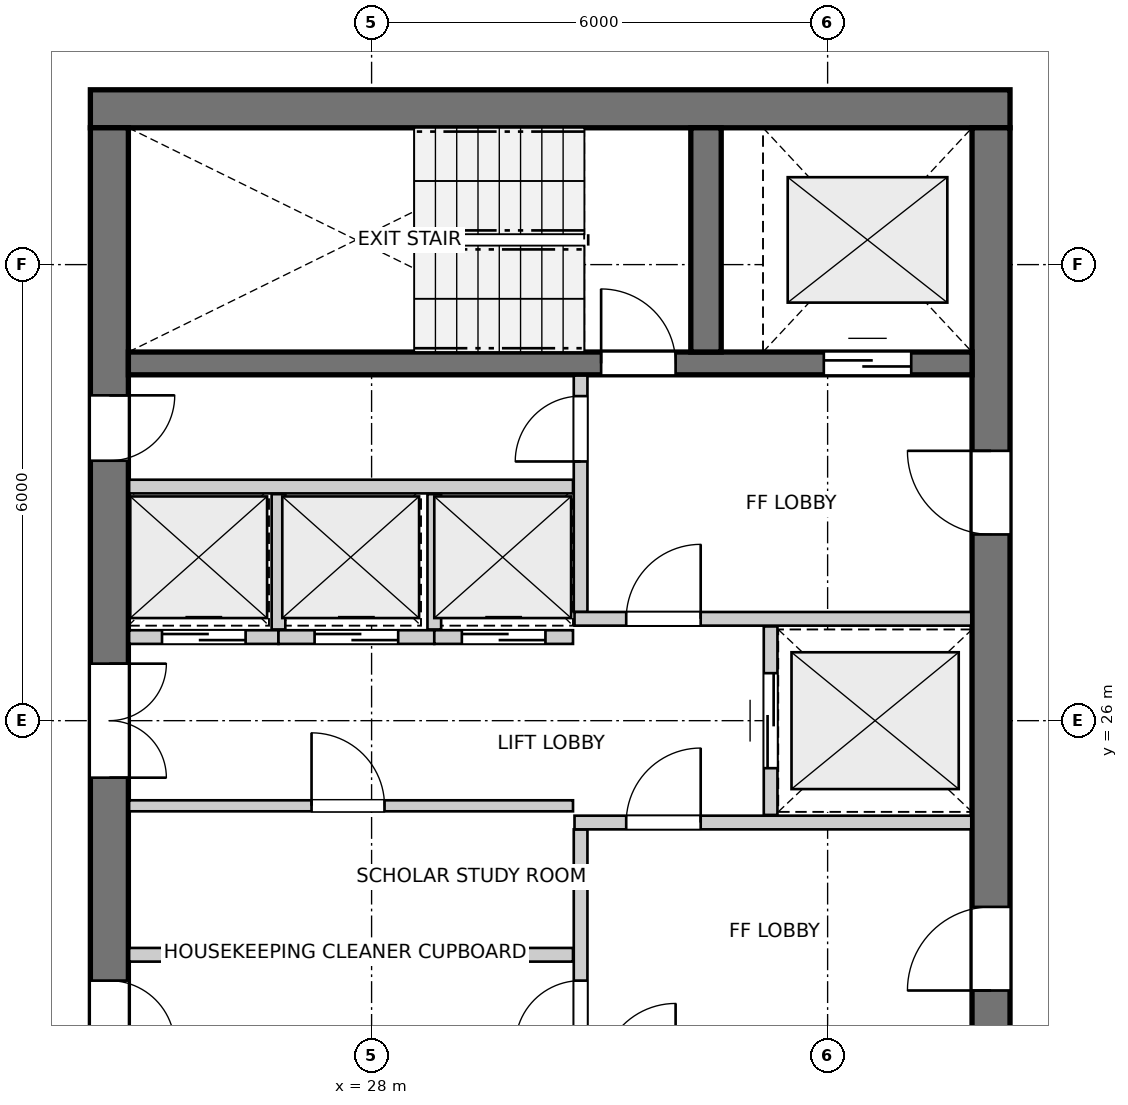
"""IFC4 building model, lengths in metres.
Left out: names, types, materials, properties, quantities, classifications, styles, units other than length and angle.
Written with IfcOpenShell. Run it as: python <this file> out.ifc"""

import sys

from ifc_helpers import new_model, si_unit, direction, frame, frame_2d, origin, place, context, subcontext, project, spatial, rectangle, extrude, source, transform, mapped, element, fill, save


model = new_model("IFC4")
c1 = context("Model", 3, precision=1e-05, world=origin(), true_north=direction((0.0, 1.0)))
c2 = subcontext(c1, "Body", "Model", "MODEL_VIEW")
j1 = project(units=[si_unit("LENGTHUNIT", "METRE"), si_unit("PLANEANGLEUNIT", "RADIAN")], contexts=[c1])
p1 = place(None, origin())
s1 = spatial("IfcSite", under=j1, at=p1, CompositionType="ELEMENT")
p2 = place(p1, origin())
s2 = spatial("IfcBuilding", under=s1, at=p2, CompositionType="ELEMENT")
p3 = place(p2, frame((0.0, 0.0, 202.0)))
s3 = spatial("IfcBuildingStorey", under=s2, at=p3, CompositionType="ELEMENT", Elevation=202.0)
p4 = place(p3, frame((36.4, 34.05, 0.0), z_axis=(0.0, 0.0, 1.0), x_axis=(-1.0, 0.0, 0.0)))
e1 = element("IfcWall", 1, at=p4, inside=s3, PredefinedType="SHEAR", context=c2, shape_type="SweptSolid", body=[
    extrude(rectangle(XDim=12.1, YDim=0.5, at=frame_2d((6.05, 0.0))), origin(), (0.0, 0.0, 1.0), 2.935),
])
p5 = place(p3, frame((24.55, 33.8, 0.0), z_axis=(0.0, 0.0, 1.0), x_axis=(0.0, -1.0, 0.0)))
e2 = element("IfcWall", 2, at=p5, inside=s3, PredefinedType="SHEAR", context=c2, shape_type="SweptSolid", body=[
    extrude(rectangle(XDim=15.6, YDim=0.5, at=frame_2d((7.8, 0.0))), origin(), (0.0, 0.0, 1.0), 2.935),
])
p6 = place(p5, frame((7.05, 0.0, 0.0)))
e3 = element("IfcOpeningElement", 3, at=p6, cuts=e2, PredefinedType="OPENING", context=c2, shape_type="SweptSolid", body=[
    extrude(rectangle(XDim=1.5, YDim=2.15, at=frame_2d((0.75, 1.075))), frame((0.0, 0.26, 0.0), z_axis=(0.0, -1.0, 0.0), x_axis=(1.0, 0.0, 0.0)), (0.0, 0.0, 1.0), 0.52),
])
p7 = place(p5, frame((3.52, 0.0, 0.0)))
e4 = element("IfcOpeningElement", 4, at=p7, cuts=e2, PredefinedType="OPENING", context=c2, shape_type="SweptSolid", body=[
    extrude(rectangle(XDim=0.86, YDim=2.05, at=frame_2d((0.43, 1.025))), frame((0.0, 0.26, 0.0), z_axis=(0.0, -1.0, 0.0), x_axis=(1.0, 0.0, 0.0)), (0.0, 0.0, 1.0), 0.52),
])
p8 = place(p5, frame((11.22, 0.0, 0.0)))
e5 = element("IfcOpeningElement", 5, at=p8, cuts=e2, PredefinedType="OPENING", context=c2, shape_type="SweptSolid", body=[
    extrude(rectangle(XDim=0.86, YDim=2.05, at=frame_2d((0.43, 1.025))), frame((0.0, 0.26, 0.0), z_axis=(0.0, -1.0, 0.0), x_axis=(1.0, 0.0, 0.0)), (0.0, 0.0, 1.0), 0.52),
])
p9 = place(p3, frame((36.15, 18.2, 0.0), z_axis=(0.0, 0.0, 1.0), x_axis=(0.0, 1.0, 0.0)))
e6 = element("IfcWall", 6, at=p9, inside=s3, PredefinedType="SHEAR", context=c2, shape_type="SweptSolid", body=[
    extrude(rectangle(XDim=15.6, YDim=0.5, at=frame_2d((7.8, 0.0))), origin(), (0.0, 0.0, 1.0), 2.935),
])
p10 = place(p9, frame((4.25, 0.0, 0.0)))
e7 = element("IfcOpeningElement", 7, at=p10, cuts=e6, PredefinedType="OPENING", context=c2, shape_type="SweptSolid", body=[
    extrude(rectangle(XDim=1.1, YDim=2.15, at=frame_2d((0.55, 1.075))), frame((0.0, 0.26, 0.0), z_axis=(0.0, -1.0, 0.0), x_axis=(1.0, 0.0, 0.0)), (0.0, 0.0, 1.0), 0.52),
])
p11 = place(p9, frame((10.25, 0.0, 0.0)))
e8 = element("IfcOpeningElement", 8, at=p11, cuts=e6, PredefinedType="OPENING", context=c2, shape_type="SweptSolid", body=[
    extrude(rectangle(XDim=1.1, YDim=2.15, at=frame_2d((0.55, 1.075))), frame((0.0, 0.26, 0.0), z_axis=(0.0, -1.0, 0.0), x_axis=(1.0, 0.0, 0.0)), (0.0, 0.0, 1.0), 0.52),
])
p12 = place(p3, frame((24.8, 30.7, 0.0), z_axis=(0.0, 0.0, 1.0), x_axis=(1.0, 0.0, 0.0)))
e9 = element("IfcWall", 9, at=p12, inside=s3, PredefinedType="SHEAR", context=c2, shape_type="SweptSolid", body=[
    extrude(rectangle(XDim=11.1, YDim=0.3, at=frame_2d((5.55, 0.0))), origin(), (0.0, 0.0, 1.0), 2.935),
])
p13 = place(p12, frame((6.22, 0.0, 0.0)))
e10 = element("IfcOpeningElement", 10, at=p13, cuts=e9, PredefinedType="OPENING", context=c2, shape_type="SweptSolid", body=[
    extrude(rectangle(XDim=0.98, YDim=2.15, at=frame_2d((0.49, 1.075))), frame((0.0, 0.16, 0.0), z_axis=(0.0, -1.0, 0.0), x_axis=(1.0, 0.0, 0.0)), (0.0, 0.0, 1.0), 0.32),
])
p14 = place(p12, frame((9.15, 0.0, 0.0)))
e11 = element("IfcOpeningElement", 11, at=p14, cuts=e9, PredefinedType="OPENING", context=c2, shape_type="SweptSolid", body=[
    extrude(rectangle(XDim=1.15, YDim=2.15, at=frame_2d((0.575, 1.075))), frame((0.0, 0.16, 0.0), z_axis=(0.0, -1.0, 0.0), x_axis=(1.0, 0.0, 0.0)), (0.0, 0.0, 1.0), 0.32),
])
p15 = place(p3, frame((32.4, 30.85, 0.0), z_axis=(0.0, 0.0, 1.0), x_axis=(0.0, 1.0, 0.0)))
e12 = element("IfcWall", 12, at=p15, inside=s3, PredefinedType="SHEAR", context=c2, shape_type="SweptSolid", body=[
    extrude(rectangle(XDim=2.95, YDim=0.4, at=frame_2d((1.475, 0.0))), origin(), (0.0, 0.0, 1.0), 2.935),
])
p16 = place(p3, frame((30.75, 21.46, 0.0), z_axis=(0.0, 0.0, 1.0), x_axis=(0.0, 1.0, 0.0)))
e13 = element("IfcWall", 13, at=p16, inside=s3, PredefinedType="PARTITIONING", context=c2, shape_type="SweptSolid", body=[
    extrude(rectangle(XDim=3.11, YDim=0.18, at=frame_2d((1.555, 0.0))), origin(), (0.0, 0.0, 1.0), 2.935),
])
p17 = place(p16, frame((0.26, 0.0, 0.0)))
e14 = element("IfcOpeningElement", 14, at=p17, cuts=e13, PredefinedType="OPENING", context=c2, shape_type="SweptSolid", body=[
    extrude(rectangle(XDim=0.86, YDim=2.05, at=frame_2d((0.43, 1.025))), frame((0.0, 0.1, 0.0), z_axis=(0.0, -1.0, 0.0), x_axis=(1.0, 0.0, 0.0)), (0.0, 0.0, 1.0), 0.2),
])
p18 = place(p3, frame((30.67, 24.66, 0.0), z_axis=(0.0, 0.0, 1.0), x_axis=(1.0, 0.0, 0.0)))
e15 = element("IfcWall", 15, at=p18, inside=s3, PredefinedType="PARTITIONING", context=c2, shape_type="SweptSolid", body=[
    extrude(rectangle(XDim=5.22, YDim=0.18, at=frame_2d((2.61, 0.0))), origin(), (0.0, 0.0, 1.0), 2.935),
])
p19 = place(p18, frame((0.68, 0.0, 0.0)))
e16 = element("IfcOpeningElement", 16, at=p19, cuts=e15, PredefinedType="OPENING", context=c2, shape_type="SweptSolid", body=[
    extrude(rectangle(XDim=0.98, YDim=2.15, at=frame_2d((0.49, 1.075))), frame((0.0, 0.1, 0.0), z_axis=(0.0, -1.0, 0.0), x_axis=(1.0, 0.0, 0.0)), (0.0, 0.0, 1.0), 0.2),
])
p20 = place(p3, frame((30.75, 27.43, 0.0), z_axis=(0.0, 0.0, 1.0), x_axis=(0.0, 1.0, 0.0)))
e17 = element("IfcWall", 17, at=p20, inside=s3, PredefinedType="PARTITIONING", context=c2, shape_type="SweptSolid", body=[
    extrude(rectangle(XDim=3.11, YDim=0.18, at=frame_2d((1.555, 0.0))), origin(), (0.0, 0.0, 1.0), 2.935),
])
p21 = place(p20, frame((1.98, 0.0, 0.0)))
e18 = element("IfcOpeningElement", 18, at=p21, cuts=e17, PredefinedType="OPENING", context=c2, shape_type="SweptSolid", body=[
    extrude(rectangle(XDim=0.86, YDim=2.05, at=frame_2d((0.43, 1.025))), frame((0.0, 0.1, 0.0), z_axis=(0.0, -1.0, 0.0), x_axis=(1.0, 0.0, 0.0)), (0.0, 0.0, 1.0), 0.2),
])
p22 = place(p3, frame((30.67, 27.34, 0.0), z_axis=(0.0, 0.0, 1.0), x_axis=(1.0, 0.0, 0.0)))
e19 = element("IfcWall", 19, at=p22, inside=s3, PredefinedType="PARTITIONING", context=c2, shape_type="SweptSolid", body=[
    extrude(rectangle(XDim=5.22, YDim=0.18, at=frame_2d((2.61, 0.0))), origin(), (0.0, 0.0, 1.0), 2.935),
])
p23 = place(p22, frame((0.68, 0.0, 0.0)))
e20 = element("IfcOpeningElement", 20, at=p23, cuts=e19, PredefinedType="OPENING", context=c2, shape_type="SweptSolid", body=[
    extrude(rectangle(XDim=0.98, YDim=2.15, at=frame_2d((0.49, 1.075))), frame((0.0, 0.1, 0.0), z_axis=(0.0, -1.0, 0.0), x_axis=(1.0, 0.0, 0.0)), (0.0, 0.0, 1.0), 0.2),
])
p24 = place(p3, frame((33.25, 24.76, 0.0), z_axis=(0.0, 0.0, 1.0), x_axis=(0.0, 1.0, 0.0)))
e21 = element("IfcWall", 21, at=p24, inside=s3, PredefinedType="PARTITIONING", context=c2, shape_type="SweptSolid", body=[
    extrude(rectangle(XDim=2.48, YDim=0.18, at=frame_2d((1.24, 0.0))), origin(), (0.0, 0.0, 1.0), 2.935),
])
p25 = place(p24, frame((0.615, 0.0, 0.0)))
e22 = element("IfcOpeningElement", 22, at=p25, cuts=e21, PredefinedType="OPENING", context=c2, shape_type="SweptSolid", body=[
    extrude(rectangle(XDim=1.25, YDim=2.15, at=frame_2d((0.625, 1.075))), frame((0.0, 0.1, 0.0), z_axis=(0.0, -1.0, 0.0), x_axis=(1.0, 0.0, 0.0)), (0.0, 0.0, 1.0), 0.2),
])
p26 = place(p3, frame((24.81, 22.92, 0.0), z_axis=(0.0, 0.0, 1.0), x_axis=(1.0, 0.0, 0.0)))
e23 = element("IfcWall", 23, at=p26, inside=s3, PredefinedType="PARTITIONING", context=c2, shape_type="SweptSolid", body=[
    extrude(rectangle(XDim=5.84, YDim=0.18, at=frame_2d((2.92, 0.0))), origin(), (0.0, 0.0, 1.0), 2.935),
])
p27 = place(p3, frame((24.81, 24.88, 0.0), z_axis=(0.0, 0.0, 1.0), x_axis=(1.0, 0.0, 0.0)))
e24 = element("IfcWall", 24, at=p27, inside=s3, PredefinedType="PARTITIONING", context=c2, shape_type="SweptSolid", body=[
    extrude(rectangle(XDim=5.84, YDim=0.145, at=frame_2d((2.92, 0.0))), origin(), (0.0, 0.0, 1.0), 2.935),
])
p28 = place(p27, frame((2.4, 0.0, 0.0)))
e25 = element("IfcOpeningElement", 25, at=p28, cuts=e24, PredefinedType="OPENING", context=c2, shape_type="SweptSolid", body=[
    extrude(rectangle(XDim=0.96, YDim=2.1, at=frame_2d((0.48, 1.05))), frame((0.0, 0.083, 0.0), z_axis=(0.0, -1.0, 0.0), x_axis=(1.0, 0.0, 0.0)), (0.0, 0.0, 1.0), 0.165),
])
p29 = place(p3, frame((24.81, 29.08, 0.0), z_axis=(0.0, 0.0, 1.0), x_axis=(1.0, 0.0, 0.0)))
e26 = element("IfcWall", 26, at=p29, inside=s3, PredefinedType="PARTITIONING", context=c2, shape_type="SweptSolid", body=[
    extrude(rectangle(XDim=5.84, YDim=0.18, at=frame_2d((2.92, 0.0))), origin(), (0.0, 0.0, 1.0), 2.935),
])
p30 = place(p3, frame((24.81, 27.1, 0.0), z_axis=(0.0, 0.0, 1.0), x_axis=(1.0, 0.0, 0.0)))
e27 = element("IfcWall", 27, at=p30, inside=s3, PredefinedType="PARTITIONING", context=c2, shape_type="SweptSolid", body=[
    extrude(rectangle(XDim=1.965, YDim=0.18, at=frame_2d((0.982, 0.0))), origin(), (0.0, 0.0, 1.0), 2.935),
])
p31 = place(p30, frame((0.433, 0.0, 0.0)))
e28 = element("IfcOpeningElement", 28, at=p31, cuts=e27, PredefinedType="OPENING", context=c2, shape_type="SweptSolid", body=[
    extrude(rectangle(XDim=1.1, YDim=2.15, at=frame_2d((0.55, 1.075))), frame((0.0, 0.1, 0.0), z_axis=(0.0, -1.0, 0.0), x_axis=(1.0, 0.0, 0.0)), (0.0, 0.0, 1.0), 0.2),
])
p32 = place(p3, frame((26.775, 27.1, 0.0), z_axis=(0.0, 0.0, 1.0), x_axis=(1.0, 0.0, 0.0)))
e29 = element("IfcWall", 29, at=p32, inside=s3, PredefinedType="PARTITIONING", context=c2, shape_type="SweptSolid", body=[
    extrude(rectangle(XDim=2.05, YDim=0.18, at=frame_2d((1.025, 0.0))), origin(), (0.0, 0.0, 1.0), 2.935),
])
p33 = place(p32, frame((0.475, 0.0, 0.0)))
e30 = element("IfcOpeningElement", 30, at=p33, cuts=e29, PredefinedType="OPENING", context=c2, shape_type="SweptSolid", body=[
    extrude(rectangle(XDim=1.1, YDim=2.15, at=frame_2d((0.55, 1.075))), frame((0.0, 0.1, 0.0), z_axis=(0.0, -1.0, 0.0), x_axis=(1.0, 0.0, 0.0)), (0.0, 0.0, 1.0), 0.2),
])
p34 = place(p3, frame((26.775, 27.2, 0.0), z_axis=(0.0, 0.0, 1.0), x_axis=(0.0, 1.0, 0.0)))
e31 = element("IfcWall", 31, at=p34, inside=s3, PredefinedType="PARTITIONING", context=c2, shape_type="SweptSolid", body=[
    extrude(rectangle(XDim=1.78, YDim=0.18, at=frame_2d((0.89, 0.0))), origin(), (0.0, 0.0, 1.0), 2.935),
])
p35 = place(p3, frame((28.825, 27.1, 0.0), z_axis=(0.0, 0.0, 1.0), x_axis=(1.0, 0.0, 0.0)))
e32 = element("IfcWall", 32, at=p35, inside=s3, PredefinedType="PARTITIONING", context=c2, shape_type="SweptSolid", body=[
    extrude(rectangle(XDim=1.825, YDim=0.18, at=frame_2d((0.913, 0.0))), origin(), (0.0, 0.0, 1.0), 2.935),
])
p36 = place(p35, frame((0.363, 0.0, 0.0)))
e33 = element("IfcOpeningElement", 33, at=p36, cuts=e32, PredefinedType="OPENING", context=c2, shape_type="SweptSolid", body=[
    extrude(rectangle(XDim=1.1, YDim=2.15, at=frame_2d((0.55, 1.075))), frame((0.0, 0.1, 0.0), z_axis=(0.0, -1.0, 0.0), x_axis=(1.0, 0.0, 0.0)), (0.0, 0.0, 1.0), 0.2),
])
p37 = place(p3, frame((28.825, 27.2, 0.0), z_axis=(0.0, 0.0, 1.0), x_axis=(0.0, 1.0, 0.0)))
e34 = element("IfcWall", 34, at=p37, inside=s3, PredefinedType="PARTITIONING", context=c2, shape_type="SweptSolid", body=[
    extrude(rectangle(XDim=1.78, YDim=0.18, at=frame_2d((0.89, 0.0))), origin(), (0.0, 0.0, 1.0), 2.935),
])
m1 = source(origin(), c2, "Body", "SweptSolid", [
    extrude(rectangle(XDim=0.98, YDim=2.15, at=frame_2d((0.49, 1.075))), frame((0.0, 0.025, 0.0), z_axis=(0.0, -1.0, 0.0), x_axis=(1.0, 0.0, 0.0)), (0.0, 0.0, 1.0), 0.05),
])
p38 = place(p13, origin())
e35 = element("IfcDoor", 35, at=p38, inside=s3, OperationType="SINGLE_SWING_LEFT", PredefinedType="DOOR", context=c2, shape_type="MappedRepresentation", body=[
    mapped(m1, transform((0.0, 0.0, 0.0), x_axis=(1.0, 0.0, 0.0), y_axis=(0.0, 1.0, 0.0), z_axis=(0.0, 0.0, 1.0), scale=1.0)),
])
fill(e10, e35)
m2 = source(origin(), c2, "Body", "SweptSolid", [
    extrude(rectangle(XDim=1.15, YDim=2.15, at=frame_2d((0.575, 1.075))), frame((0.0, 0.025, 0.0), z_axis=(0.0, -1.0, 0.0), x_axis=(1.0, 0.0, 0.0)), (0.0, 0.0, 1.0), 0.05),
])
p39 = place(p14, origin())
e36 = element("IfcDoor", 36, at=p39, inside=s3, OperationType="DOUBLE_DOOR_SLIDING", PredefinedType="DOOR", context=c2, shape_type="MappedRepresentation", body=[
    mapped(m2, transform((0.0, 0.0, 0.0), x_axis=(1.0, 0.0, 0.0), y_axis=(0.0, 1.0, 0.0), z_axis=(0.0, 0.0, 1.0), scale=1.0)),
])
fill(e11, e36)
m3 = source(origin(), c2, "Body", "SweptSolid", [
    extrude(rectangle(XDim=1.1, YDim=2.15, at=frame_2d((0.55, 1.075))), frame((0.0, 0.025, 0.0), z_axis=(0.0, -1.0, 0.0), x_axis=(1.0, 0.0, 0.0)), (0.0, 0.0, 1.0), 0.05),
])
p40 = place(p10, origin())
e37 = element("IfcDoor", 37, at=p40, inside=s3, OperationType="SINGLE_SWING_LEFT", PredefinedType="DOOR", context=c2, shape_type="MappedRepresentation", body=[
    mapped(m3, transform((0.0, 0.0, 0.0), x_axis=(1.0, 0.0, 0.0), y_axis=(0.0, 1.0, 0.0), z_axis=(0.0, 0.0, 1.0), scale=1.0)),
])
fill(e7, e37)
p41 = place(p11, origin())
e38 = element("IfcDoor", 38, at=p41, inside=s3, OperationType="SINGLE_SWING_RIGHT", PredefinedType="DOOR", context=c2, shape_type="MappedRepresentation", body=[
    mapped(m3, transform((0.0, 0.0, 0.0), x_axis=(1.0, 0.0, 0.0), y_axis=(0.0, 1.0, 0.0), z_axis=(0.0, 0.0, 1.0), scale=1.0)),
])
fill(e8, e38)
m4 = source(origin(), c2, "Body", "SweptSolid", [
    extrude(rectangle(XDim=1.5, YDim=2.15, at=frame_2d((0.75, 1.075))), frame((0.0, 0.025, 0.0), z_axis=(0.0, -1.0, 0.0), x_axis=(1.0, 0.0, 0.0)), (0.0, 0.0, 1.0), 0.05),
])
p42 = place(p6, origin())
e39 = element("IfcDoor", 39, at=p42, inside=s3, OperationType="DOUBLE_DOOR_SINGLE_SWING", PredefinedType="DOOR", context=c2, shape_type="MappedRepresentation", body=[
    mapped(m4, transform((0.0, 0.0, 0.0), x_axis=(1.0, 0.0, 0.0), y_axis=(0.0, 1.0, 0.0), z_axis=(0.0, 0.0, 1.0), scale=1.0)),
])
fill(e3, e39)
m5 = source(origin(), c2, "Body", "SweptSolid", [
    extrude(rectangle(XDim=0.86, YDim=2.05, at=frame_2d((0.43, 1.025))), frame((0.0, 0.025, 0.0), z_axis=(0.0, -1.0, 0.0), x_axis=(1.0, 0.0, 0.0)), (0.0, 0.0, 1.0), 0.05),
])
p43 = place(p7, origin())
e40 = element("IfcDoor", 40, at=p43, inside=s3, OperationType="SINGLE_SWING_LEFT", PredefinedType="DOOR", context=c2, shape_type="MappedRepresentation", body=[
    mapped(m5, transform((0.0, 0.0, 0.0), x_axis=(1.0, 0.0, 0.0), y_axis=(0.0, 1.0, 0.0), z_axis=(0.0, 0.0, 1.0), scale=1.0)),
])
fill(e4, e40)
p44 = place(p8, origin())
e41 = element("IfcDoor", 41, at=p44, inside=s3, OperationType="SINGLE_SWING_RIGHT", PredefinedType="DOOR", context=c2, shape_type="MappedRepresentation", body=[
    mapped(m5, transform((0.0, 0.0, 0.0), x_axis=(1.0, 0.0, 0.0), y_axis=(0.0, 1.0, 0.0), z_axis=(0.0, 0.0, 1.0), scale=1.0)),
])
fill(e5, e41)
p45 = place(p17, origin())
e42 = element("IfcDoor", 42, at=p45, inside=s3, OperationType="SINGLE_SWING_LEFT", PredefinedType="DOOR", context=c2, shape_type="MappedRepresentation", body=[
    mapped(m5, transform((0.0, 0.0, 0.0), x_axis=(1.0, 0.0, 0.0), y_axis=(0.0, 1.0, 0.0), z_axis=(0.0, 0.0, 1.0), scale=1.0)),
])
fill(e14, e42)
p46 = place(p19, origin())
e43 = element("IfcDoor", 43, at=p46, inside=s3, OperationType="SINGLE_SWING_RIGHT", PredefinedType="DOOR", context=c2, shape_type="MappedRepresentation", body=[
    mapped(m1, transform((0.0, 0.0, 0.0), x_axis=(1.0, 0.0, 0.0), y_axis=(0.0, 1.0, 0.0), z_axis=(0.0, 0.0, 1.0), scale=1.0)),
])
fill(e16, e43)
p47 = place(p21, origin())
e44 = element("IfcDoor", 44, at=p47, inside=s3, OperationType="SINGLE_SWING_LEFT", PredefinedType="DOOR", context=c2, shape_type="MappedRepresentation", body=[
    mapped(m5, transform((0.0, 0.0, 0.0), x_axis=(1.0, 0.0, 0.0), y_axis=(0.0, 1.0, 0.0), z_axis=(0.0, 0.0, 1.0), scale=1.0)),
])
fill(e18, e44)
p48 = place(p23, origin())
e45 = element("IfcDoor", 45, at=p48, inside=s3, OperationType="SINGLE_SWING_RIGHT", PredefinedType="DOOR", context=c2, shape_type="MappedRepresentation", body=[
    mapped(m1, transform((0.0, 0.0, 0.0), x_axis=(1.0, 0.0, 0.0), y_axis=(0.0, 1.0, 0.0), z_axis=(0.0, 0.0, 1.0), scale=1.0)),
])
fill(e20, e45)
m6 = source(origin(), c2, "Body", "SweptSolid", [
    extrude(rectangle(XDim=1.25, YDim=2.15, at=frame_2d((0.625, 1.075))), frame((0.0, 0.025, 0.0), z_axis=(0.0, -1.0, 0.0), x_axis=(1.0, 0.0, 0.0)), (0.0, 0.0, 1.0), 0.05),
])
p49 = place(p25, origin())
e46 = element("IfcDoor", 46, at=p49, inside=s3, OperationType="DOUBLE_DOOR_SLIDING", PredefinedType="DOOR", context=c2, shape_type="MappedRepresentation", body=[
    mapped(m6, transform((0.0, 0.0, 0.0), x_axis=(1.0, 0.0, 0.0), y_axis=(0.0, 1.0, 0.0), z_axis=(0.0, 0.0, 1.0), scale=1.0)),
])
fill(e22, e46)
m7 = source(origin(), c2, "Body", "SweptSolid", [
    extrude(rectangle(XDim=0.96, YDim=2.1, at=frame_2d((0.48, 1.05))), frame((0.0, 0.025, 0.0), z_axis=(0.0, -1.0, 0.0), x_axis=(1.0, 0.0, 0.0)), (0.0, 0.0, 1.0), 0.05),
])
p50 = place(p28, origin())
e47 = element("IfcDoor", 47, at=p50, inside=s3, OperationType="SINGLE_SWING_LEFT", PredefinedType="DOOR", context=c2, shape_type="MappedRepresentation", body=[
    mapped(m7, transform((0.0, 0.0, 0.0), x_axis=(1.0, 0.0, 0.0), y_axis=(0.0, 1.0, 0.0), z_axis=(0.0, 0.0, 1.0), scale=1.0)),
])
fill(e25, e47)
p51 = place(p31, origin())
e48 = element("IfcDoor", 48, at=p51, inside=s3, OperationType="DOUBLE_DOOR_SLIDING", PredefinedType="DOOR", context=c2, shape_type="MappedRepresentation", body=[
    mapped(m3, transform((0.0, 0.0, 0.0), x_axis=(1.0, 0.0, 0.0), y_axis=(0.0, 1.0, 0.0), z_axis=(0.0, 0.0, 1.0), scale=1.0)),
])
fill(e28, e48)
p52 = place(p33, origin())
e49 = element("IfcDoor", 49, at=p52, inside=s3, OperationType="DOUBLE_DOOR_SLIDING", PredefinedType="DOOR", context=c2, shape_type="MappedRepresentation", body=[
    mapped(m3, transform((0.0, 0.0, 0.0), x_axis=(1.0, 0.0, 0.0), y_axis=(0.0, 1.0, 0.0), z_axis=(0.0, 0.0, 1.0), scale=1.0)),
])
fill(e30, e49)
p53 = place(p36, origin())
e50 = element("IfcDoor", 50, at=p53, inside=s3, OperationType="DOUBLE_DOOR_SLIDING", PredefinedType="DOOR", context=c2, shape_type="MappedRepresentation", body=[
    mapped(m3, transform((0.0, 0.0, 0.0), x_axis=(1.0, 0.0, 0.0), y_axis=(0.0, 1.0, 0.0), z_axis=(0.0, 0.0, 1.0), scale=1.0)),
])
fill(e33, e50)
save(model, sys.argv[1])
